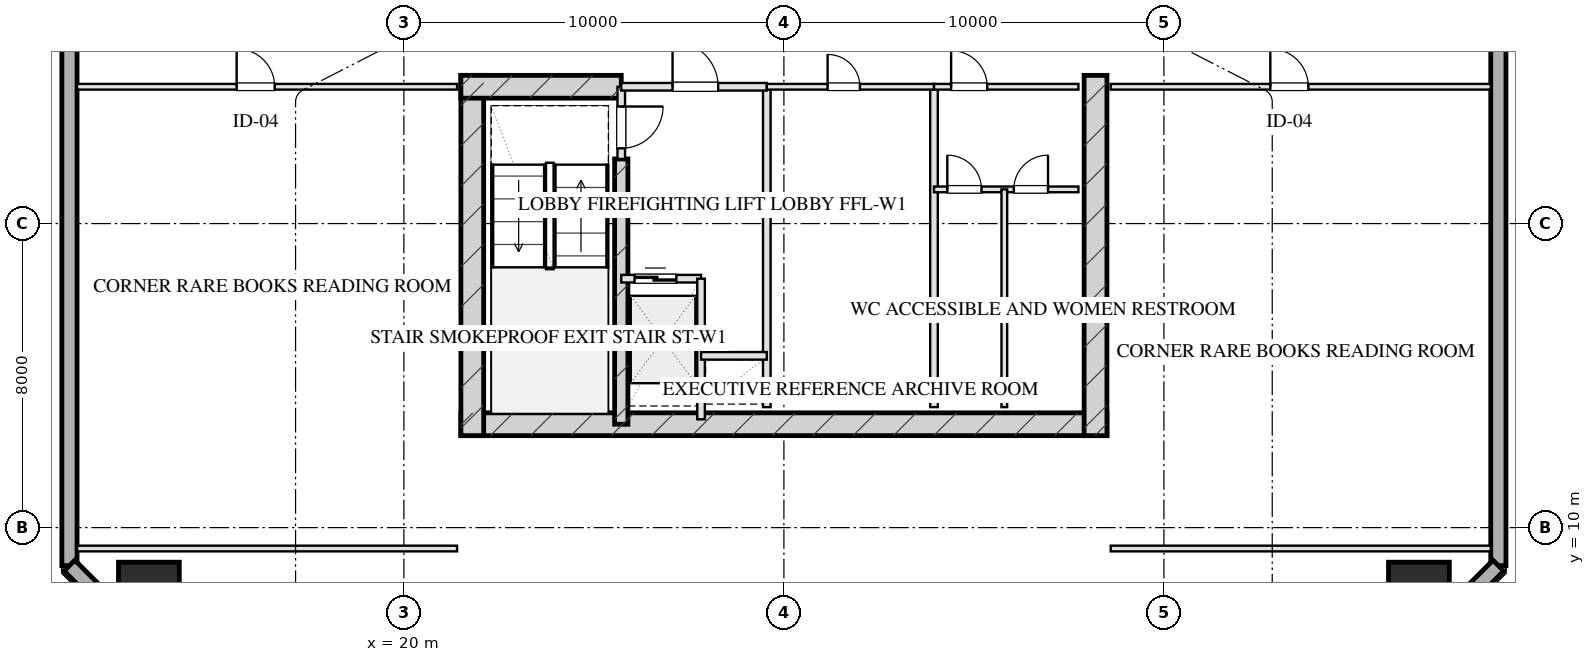
"""IFC4 building model, lengths in metres.
Left out: names, types, materials, properties, quantities, classifications, styles, units other than length and angle.
Written with IfcOpenShell. Run it as: python <this file> out.ifc"""

import sys

from ifc_helpers import new_model, si_unit, direction, frame, frame_2d, origin, origin_2d, place, context, subcontext, project, spatial, rectangle, hollow_rectangle, extrude, element, fill, save


model = new_model("IFC4")
c1 = context("Model", 3, precision=1e-05, world=origin(), true_north=direction((0.0, 1.0)))
c2 = subcontext(c1, "Body", "Model", "MODEL_VIEW")
j1 = project(units=[si_unit("LENGTHUNIT", "METRE"), si_unit("PLANEANGLEUNIT", "RADIAN")], contexts=[c1])
p1 = place(None, origin())
s1 = spatial("IfcSite", under=j1, at=p1, CompositionType="ELEMENT")
p2 = place(p1, origin())
s2 = spatial("IfcBuilding", under=s1, at=p2, CompositionType="ELEMENT")
p3 = place(p2, frame((0.0, 0.0, 96.6)))
s3 = spatial("IfcBuildingStorey", under=s2, at=p3, CompositionType="ELEMENT", Elevation=96.6)
p4 = place(p3, frame((21.5, 12.72, 0.0), z_axis=(0.0, 0.0, 1.0), x_axis=(1.0, 0.0, 0.0)))
e1 = element("IfcWall", 1, at=p4, inside=s3, PredefinedType="SHEAR", context=c2, shape_type="SweptSolid", body=[
    extrude(rectangle(XDim=17.0, YDim=0.6, at=frame_2d((8.5, 0.0))), origin(), (0.0, 0.0, 1.0), 3.45),
])
for number, where, z_axis, x_axis in (
    (2, (21.8, 21.9, 0.0), (0.0, 0.0, 1.0), (0.0, -1.0, 0.0)),
    (3, (38.2, 21.9, 0.0), (0.0, 0.0, 1.0), (0.0, -1.0, 0.0)),
):
    element("IfcWall", number, at=place(p3, frame(where, z_axis=z_axis, x_axis=x_axis)), inside=s3, PredefinedType="SHEAR", context=c2, shape_type="SweptSolid", body=[
        extrude(rectangle(XDim=9.48, YDim=0.6, at=frame_2d((4.74, 0.0))), origin(), (0.0, 0.0, 1.0), 3.45),
    ])
p5 = place(p3, frame((25.72, 19.7, 0.0), z_axis=(0.0, 0.0, 1.0), x_axis=(0.0, -1.0, 0.0)))
e4 = element("IfcWall", 4, at=p5, inside=s3, PredefinedType="SHEAR", context=c2, shape_type="SweptSolid", body=[
    extrude(rectangle(XDim=6.98, YDim=0.35, at=frame_2d((3.49, 0.0))), origin(), (0.0, 0.0, 1.0), 3.45),
])
p6 = place(p3, frame((21.5, 21.6, 0.0), z_axis=(0.0, 0.0, 1.0), x_axis=(1.0, 0.0, 0.0)))
e5 = element("IfcWall", 5, at=p6, inside=s3, PredefinedType="SHEAR", context=c2, shape_type="SweptSolid", body=[
    extrude(rectangle(XDim=4.22, YDim=0.6, at=frame_2d((2.11, 0.0))), origin(), (0.0, 0.0, 1.0), 3.45),
])
for number, where, z_axis, x_axis in (
    (6, (13.29, 8.29, 0.0), (0.0, 0.0, 1.0), (1.0, 0.0, 0.0)),
    (7, (46.71, 8.29, 0.0), (0.0, 0.0, 1.0), (1.0, 0.0, 0.0)),
):
    element("IfcColumn", number, at=place(p3, frame(where, z_axis=z_axis, x_axis=x_axis)), inside=s3, PredefinedType="COLUMN", context=c2, shape_type="SweptSolid", body=[
        extrude(hollow_rectangle(XDim=1.6, YDim=1.6, WallThickness=0.055, at=origin_2d()), origin(), (0.0, 0.0, 1.0), 3.451),
    ])
p7 = place(p3, frame((11.2, 9.0, 0.0), z_axis=(0.0, 0.0, 1.0), x_axis=(0.0, 1.0, 0.0)))
e8 = element("IfcWall", 8, at=p7, inside=s3, PredefinedType="SOLIDWALL", context=c2, shape_type="SweptSolid", body=[
    extrude(rectangle(XDim=50.0, YDim=0.4, at=frame_2d((25.0, 0.0))), origin(), (0.0, 0.0, 1.0), 2.55),
])
p8 = place(p7, frame((21.2, 0.0, 0.75)))
e9 = element("IfcOpeningElement", 9, at=p8, cuts=e8, PredefinedType="OPENING", context=c2, shape_type="SweptSolid", body=[
    extrude(rectangle(XDim=2.4, YDim=1.4, at=frame_2d((1.2, 0.7))), frame((0.0, 0.21, 0.0), z_axis=(0.0, -1.0, 0.0), x_axis=(1.0, 0.0, 0.0)), (0.0, 0.0, 1.0), 0.42),
])
p9 = place(p7, frame((26.4, 0.0, 0.75)))
e10 = element("IfcOpeningElement", 10, at=p9, cuts=e8, PredefinedType="OPENING", context=c2, shape_type="SweptSolid", body=[
    extrude(rectangle(XDim=2.4, YDim=1.4, at=frame_2d((1.2, 0.7))), frame((0.0, 0.21, 0.0), z_axis=(0.0, -1.0, 0.0), x_axis=(1.0, 0.0, 0.0)), (0.0, 0.0, 1.0), 0.42),
])
p10 = place(p3, frame((48.8, 59.0, 0.0), z_axis=(0.0, 0.0, 1.0), x_axis=(0.0, -1.0, 0.0)))
e11 = element("IfcWall", 11, at=p10, inside=s3, PredefinedType="SOLIDWALL", context=c2, shape_type="SweptSolid", body=[
    extrude(rectangle(XDim=50.0, YDim=0.4, at=frame_2d((25.0, 0.0))), origin(), (0.0, 0.0, 1.0), 2.55),
])
for number, where, z_axis, x_axis in (
    (12, (48.8, 9.0, 0.0), (0.0, 0.0, 1.0), (-0.707, -0.707, 0.0)),
    (13, (14.0, 6.2, 0.0), (0.0, 0.0, 1.0), (-0.707, 0.707, 0.0)),
):
    element("IfcWall", number, at=place(p3, frame(where, z_axis=z_axis, x_axis=x_axis)), inside=s3, PredefinedType="SOLIDWALL", context=c2, shape_type="SweptSolid", body=[
        extrude(rectangle(XDim=3.96, YDim=0.4, at=frame_2d((1.98, 0.0))), origin(), (0.0, 0.0, 1.0), 2.55),
    ])
p11 = place(p3, frame((25.72, 21.6, 0.0), z_axis=(0.0, 0.0, 1.0), x_axis=(0.0, -1.0, 0.0)))
e14 = element("IfcWall", 14, at=p11, inside=s3, PredefinedType="PARTITIONING", context=c2, shape_type="SweptSolid", body=[
    extrude(rectangle(XDim=1.9, YDim=0.2, at=frame_2d((0.95, 0.0))), origin(), (0.0, 0.0, 1.0), 3.155),
])
p12 = place(p11, frame((0.52, 0.0, 0.0)))
e15 = element("IfcOpeningElement", 15, at=p12, cuts=e14, PredefinedType="OPENING", context=c2, shape_type="SweptSolid", body=[
    extrude(rectangle(XDim=1.1, YDim=2.05, at=frame_2d((0.55, 1.025))), frame((0.0, 0.11, 0.0), z_axis=(0.0, -1.0, 0.0), x_axis=(1.0, 0.0, 0.0)), (0.0, 0.0, 1.0), 0.22),
])
p13 = place(p3, frame((29.55, 21.6, 0.0), z_axis=(0.0, 0.0, 1.0), x_axis=(0.0, -1.0, 0.0)))
e16 = element("IfcWall", 16, at=p13, inside=s3, PredefinedType="PARTITIONING", context=c2, shape_type="SweptSolid", body=[
    extrude(rectangle(XDim=8.43, YDim=0.2, at=frame_2d((4.215, 0.0))), origin(), (0.0, 0.0, 1.0), 3.155),
])
p14 = place(p3, frame((25.72, 21.6, 0.0), z_axis=(0.0, 0.0, 1.0), x_axis=(1.0, 0.0, 0.0)))
e17 = element("IfcWall", 17, at=p14, inside=s3, PredefinedType="PARTITIONING", context=c2, shape_type="SweptSolid", body=[
    extrude(rectangle(XDim=3.83, YDim=0.2, at=frame_2d((1.915, 0.0))), origin(), (0.0, 0.0, 1.0), 3.155),
])
p15 = place(p14, frame((1.35, 0.0, 0.0)))
e18 = element("IfcOpeningElement", 18, at=p15, cuts=e17, PredefinedType="OPENING", context=c2, shape_type="SweptSolid", body=[
    extrude(rectangle(XDim=1.2, YDim=2.05, at=frame_2d((0.6, 1.025))), frame((0.0, 0.11, 0.0), z_axis=(0.0, -1.0, 0.0), x_axis=(1.0, 0.0, 0.0)), (0.0, 0.0, 1.0), 0.22),
])
p16 = place(p3, frame((25.72, 16.55, 0.0), z_axis=(0.0, 0.0, 1.0), x_axis=(1.0, 0.0, 0.0)))
e19 = element("IfcWall", 19, at=p16, inside=s3, PredefinedType="PARTITIONING", context=c2, shape_type="SweptSolid", body=[
    extrude(rectangle(XDim=2.1, YDim=0.2, at=frame_2d((1.05, 0.0))), origin(), (0.0, 0.0, 1.0), 3.155),
])
p17 = place(p16, frame((0.35, 0.0, 0.0)))
e20 = element("IfcOpeningElement", 20, at=p17, cuts=e19, PredefinedType="OPENING", context=c2, shape_type="SweptSolid", body=[
    extrude(rectangle(XDim=1.1, YDim=2.05, at=frame_2d((0.55, 1.025))), frame((0.0, 0.11, 0.0), z_axis=(0.0, -1.0, 0.0), x_axis=(1.0, 0.0, 0.0)), (0.0, 0.0, 1.0), 0.22),
])
p18 = place(p3, frame((27.82, 16.55, 0.0), z_axis=(0.0, 0.0, 1.0), x_axis=(0.0, -1.0, 0.0)))
e21 = element("IfcWall", 21, at=p18, inside=s3, PredefinedType="PARTITIONING", context=c2, shape_type="SweptSolid", body=[
    extrude(rectangle(XDim=3.7, YDim=0.2, at=frame_2d((1.85, 0.0))), origin(), (0.0, 0.0, 1.0), 3.155),
])
p19 = place(p3, frame((27.82, 14.52, 0.0), z_axis=(0.0, 0.0, 1.0), x_axis=(1.0, 0.0, 0.0)))
e22 = element("IfcWall", 22, at=p19, inside=s3, PredefinedType="PARTITIONING", context=c2, shape_type="SweptSolid", body=[
    extrude(rectangle(XDim=1.73, YDim=0.2, at=frame_2d((0.865, 0.0))), origin(), (0.0, 0.0, 1.0), 3.155),
])
p20 = place(p3, frame((33.95, 21.6, 0.0), z_axis=(0.0, 0.0, 1.0), x_axis=(0.0, -1.0, 0.0)))
e23 = element("IfcWall", 23, at=p20, inside=s3, PredefinedType="PARTITIONING", context=c2, shape_type="SweptSolid", body=[
    extrude(rectangle(XDim=8.43, YDim=0.2, at=frame_2d((4.215, 0.0))), origin(), (0.0, 0.0, 1.0), 3.155),
])
p21 = place(p3, frame((29.55, 21.6, 0.0), z_axis=(0.0, 0.0, 1.0), x_axis=(1.0, 0.0, 0.0)))
e24 = element("IfcWall", 24, at=p21, inside=s3, PredefinedType="PARTITIONING", context=c2, shape_type="SweptSolid", body=[
    extrude(rectangle(XDim=4.4, YDim=0.15, at=frame_2d((2.2, 0.0))), origin(), (0.0, 0.0, 1.0), 3.155),
])
p22 = place(p21, frame((1.6, 0.0, 0.0)))
e25 = element("IfcOpeningElement", 25, at=p22, cuts=e24, PredefinedType="OPENING", context=c2, shape_type="SweptSolid", body=[
    extrude(rectangle(XDim=0.85, YDim=2.05, at=frame_2d((0.425, 1.025))), frame((0.0, 0.085, 0.0), z_axis=(0.0, -1.0, 0.0), x_axis=(1.0, 0.0, 0.0)), (0.0, 0.0, 1.0), 0.17),
])
p23 = place(p3, frame((33.95, 21.6, 0.0), z_axis=(0.0, 0.0, 1.0), x_axis=(1.0, 0.0, 0.0)))
e26 = element("IfcWall", 26, at=p23, inside=s3, PredefinedType="PARTITIONING", context=c2, shape_type="SweptSolid", body=[
    extrude(rectangle(XDim=3.8, YDim=0.15, at=frame_2d((1.9, 0.0))), origin(), (0.0, 0.0, 1.0), 3.155),
])
p24 = place(p23, frame((0.45, 0.0, 0.0)))
e27 = element("IfcOpeningElement", 27, at=p24, cuts=e26, PredefinedType="OPENING", context=c2, shape_type="SweptSolid", body=[
    extrude(rectangle(XDim=0.95, YDim=2.05, at=frame_2d((0.475, 1.025))), frame((0.0, 0.085, 0.0), z_axis=(0.0, -1.0, 0.0), x_axis=(1.0, 0.0, 0.0)), (0.0, 0.0, 1.0), 0.17),
])
p25 = place(p3, frame((33.95, 18.9, 0.0), z_axis=(0.0, 0.0, 1.0), x_axis=(1.0, 0.0, 0.0)))
e28 = element("IfcWall", 28, at=p25, inside=s3, PredefinedType="PARTITIONING", context=c2, shape_type="SweptSolid", body=[
    extrude(rectangle(XDim=3.8, YDim=0.15, at=frame_2d((1.9, 0.0))), origin(), (0.0, 0.0, 1.0), 3.155),
])
p26 = place(p25, frame((0.35, 0.0, 0.0)))
e29 = element("IfcOpeningElement", 29, at=p26, cuts=e28, PredefinedType="OPENING", context=c2, shape_type="SweptSolid", body=[
    extrude(rectangle(XDim=0.9, YDim=2.05, at=frame_2d((0.45, 1.025))), frame((0.0, 0.085, 0.0), z_axis=(0.0, -1.0, 0.0), x_axis=(1.0, 0.0, 0.0)), (0.0, 0.0, 1.0), 0.17),
])
p27 = place(p25, frame((2.1, 0.0, 0.0)))
e30 = element("IfcOpeningElement", 30, at=p27, cuts=e28, PredefinedType="OPENING", context=c2, shape_type="SweptSolid", body=[
    extrude(rectangle(XDim=0.9, YDim=2.05, at=frame_2d((0.45, 1.025))), frame((0.0, 0.085, 0.0), z_axis=(0.0, -1.0, 0.0), x_axis=(1.0, 0.0, 0.0)), (0.0, 0.0, 1.0), 0.17),
])
p28 = place(p3, frame((35.8, 18.9, 0.0), z_axis=(0.0, 0.0, 1.0), x_axis=(0.0, -1.0, 0.0)))
e31 = element("IfcWall", 31, at=p28, inside=s3, PredefinedType="PARTITIONING", context=c2, shape_type="SweptSolid", body=[
    extrude(rectangle(XDim=5.73, YDim=0.15, at=frame_2d((2.865, 0.0))), origin(), (0.0, 0.0, 1.0), 3.155),
])
p29 = place(p3, frame((11.4, 9.45, 0.0), z_axis=(0.0, 0.0, 1.0), x_axis=(1.0, 0.0, 0.0)))
e32 = element("IfcWall", 32, at=p29, inside=s3, PredefinedType="PARTITIONING", context=c2, shape_type="SweptSolid", body=[
    extrude(rectangle(XDim=10.0, YDim=0.15, at=frame_2d((5.0, 0.0))), origin(), (0.0, 0.0, 1.0), 3.155),
])
p30 = place(p3, frame((11.4, 21.6, 0.0), z_axis=(0.0, 0.0, 1.0), x_axis=(1.0, 0.0, 0.0)))
e33 = element("IfcWall", 33, at=p30, inside=s3, PredefinedType="PARTITIONING", context=c2, shape_type="SweptSolid", body=[
    extrude(rectangle(XDim=10.0, YDim=0.15, at=frame_2d((5.0, 0.0))), origin(), (0.0, 0.0, 1.0), 3.155),
])
p31 = place(p30, frame((4.2, 0.0, 0.0)))
e34 = element("IfcOpeningElement", 34, at=p31, cuts=e33, PredefinedType="OPENING", context=c2, shape_type="SweptSolid", body=[
    extrude(rectangle(XDim=1.0, YDim=2.05, at=frame_2d((0.5, 1.025))), frame((0.0, 0.085, 0.0), z_axis=(0.0, -1.0, 0.0), x_axis=(1.0, 0.0, 0.0)), (0.0, 0.0, 1.0), 0.17),
])
p32 = place(p3, frame((38.6, 9.45, 0.0), z_axis=(0.0, 0.0, 1.0), x_axis=(1.0, 0.0, 0.0)))
e35 = element("IfcWall", 35, at=p32, inside=s3, PredefinedType="PARTITIONING", context=c2, shape_type="SweptSolid", body=[
    extrude(rectangle(XDim=10.0, YDim=0.15, at=frame_2d((5.0, 0.0))), origin(), (0.0, 0.0, 1.0), 3.155),
])
p33 = place(p3, frame((38.6, 21.6, 0.0), z_axis=(0.0, 0.0, 1.0), x_axis=(1.0, 0.0, 0.0)))
e36 = element("IfcWall", 36, at=p33, inside=s3, PredefinedType="PARTITIONING", context=c2, shape_type="SweptSolid", body=[
    extrude(rectangle(XDim=10.0, YDim=0.15, at=frame_2d((5.0, 0.0))), origin(), (0.0, 0.0, 1.0), 3.155),
])
p34 = place(p33, frame((4.2, 0.0, 0.0)))
e37 = element("IfcOpeningElement", 37, at=p34, cuts=e36, PredefinedType="OPENING", context=c2, shape_type="SweptSolid", body=[
    extrude(rectangle(XDim=1.0, YDim=2.05, at=frame_2d((0.5, 1.025))), frame((0.0, 0.085, 0.0), z_axis=(0.0, -1.0, 0.0), x_axis=(1.0, 0.0, 0.0)), (0.0, 0.0, 1.0), 0.17),
])
p35 = place(p12, origin())
e38 = element("IfcDoor", 38, at=p35, inside=s3, OperationType="SINGLE_SWING_LEFT", PredefinedType="DOOR", context=c2, shape_type="SweptSolid", body=[
    extrude(rectangle(XDim=1.1, YDim=2.05, at=frame_2d((0.55, 1.025))), frame((0.0, 0.025, 0.0), z_axis=(0.0, -1.0, 0.0), x_axis=(1.0, 0.0, 0.0)), (0.0, 0.0, 1.0), 0.05),
])
fill(e15, e38)
p36 = place(p15, origin())
e39 = element("IfcDoor", 39, at=p36, inside=s3, OperationType="SINGLE_SWING_LEFT", PredefinedType="DOOR", context=c2, shape_type="SweptSolid", body=[
    extrude(rectangle(XDim=1.2, YDim=2.05, at=frame_2d((0.6, 1.025))), frame((0.0, 0.025, 0.0), z_axis=(0.0, -1.0, 0.0), x_axis=(1.0, 0.0, 0.0)), (0.0, 0.0, 1.0), 0.05),
])
fill(e18, e39)
p37 = place(p17, origin())
e40 = element("IfcDoor", 40, at=p37, inside=s3, OperationType="DOUBLE_DOOR_SLIDING", PredefinedType="DOOR", context=c2, shape_type="SweptSolid", body=[
    extrude(rectangle(XDim=1.1, YDim=2.05, at=frame_2d((0.55, 1.025))), frame((0.0, 0.025, 0.0), z_axis=(0.0, -1.0, 0.0), x_axis=(1.0, 0.0, 0.0)), (0.0, 0.0, 1.0), 0.05),
])
fill(e20, e40)
p38 = place(p22, origin())
e41 = element("IfcDoor", 41, at=p38, inside=s3, OperationType="SINGLE_SWING_LEFT", PredefinedType="DOOR", context=c2, shape_type="SweptSolid", body=[
    extrude(rectangle(XDim=0.85, YDim=2.05, at=frame_2d((0.425, 1.025))), frame((0.0, 0.025, 0.0), z_axis=(0.0, -1.0, 0.0), x_axis=(1.0, 0.0, 0.0)), (0.0, 0.0, 1.0), 0.05),
])
fill(e25, e41)
p39 = place(p24, origin())
e42 = element("IfcDoor", 42, at=p39, inside=s3, OperationType="SINGLE_SWING_LEFT", PredefinedType="DOOR", context=c2, shape_type="SweptSolid", body=[
    extrude(rectangle(XDim=0.95, YDim=2.05, at=frame_2d((0.475, 1.025))), frame((0.0, 0.025, 0.0), z_axis=(0.0, -1.0, 0.0), x_axis=(1.0, 0.0, 0.0)), (0.0, 0.0, 1.0), 0.05),
])
fill(e27, e42)
p40 = place(p26, origin())
e43 = element("IfcDoor", 43, at=p40, inside=s3, OperationType="SINGLE_SWING_LEFT", PredefinedType="DOOR", context=c2, shape_type="SweptSolid", body=[
    extrude(rectangle(XDim=0.9, YDim=2.05, at=frame_2d((0.45, 1.025))), frame((0.0, 0.025, 0.0), z_axis=(0.0, -1.0, 0.0), x_axis=(1.0, 0.0, 0.0)), (0.0, 0.0, 1.0), 0.05),
])
fill(e29, e43)
p41 = place(p27, origin())
e44 = element("IfcDoor", 44, at=p41, inside=s3, OperationType="SINGLE_SWING_RIGHT", PredefinedType="DOOR", context=c2, shape_type="SweptSolid", body=[
    extrude(rectangle(XDim=0.9, YDim=2.05, at=frame_2d((0.45, 1.025))), frame((0.0, 0.025, 0.0), z_axis=(0.0, -1.0, 0.0), x_axis=(1.0, 0.0, 0.0)), (0.0, 0.0, 1.0), 0.05),
])
fill(e30, e44)
p42 = place(p31, origin())
e45 = element("IfcDoor", 45, at=p42, inside=s3, OperationType="SINGLE_SWING_LEFT", PredefinedType="DOOR", context=c2, shape_type="SweptSolid", body=[
    extrude(rectangle(XDim=1.0, YDim=2.05, at=frame_2d((0.5, 1.025))), frame((0.0, 0.025, 0.0), z_axis=(0.0, -1.0, 0.0), x_axis=(1.0, 0.0, 0.0)), (0.0, 0.0, 1.0), 0.05),
])
fill(e34, e45)
p43 = place(p34, origin())
e46 = element("IfcDoor", 46, at=p43, inside=s3, OperationType="SINGLE_SWING_LEFT", PredefinedType="DOOR", context=c2, shape_type="SweptSolid", body=[
    extrude(rectangle(XDim=1.0, YDim=2.05, at=frame_2d((0.5, 1.025))), frame((0.0, 0.025, 0.0), z_axis=(0.0, -1.0, 0.0), x_axis=(1.0, 0.0, 0.0)), (0.0, 0.0, 1.0), 0.05),
])
fill(e37, e46)
save(model, sys.argv[1])
